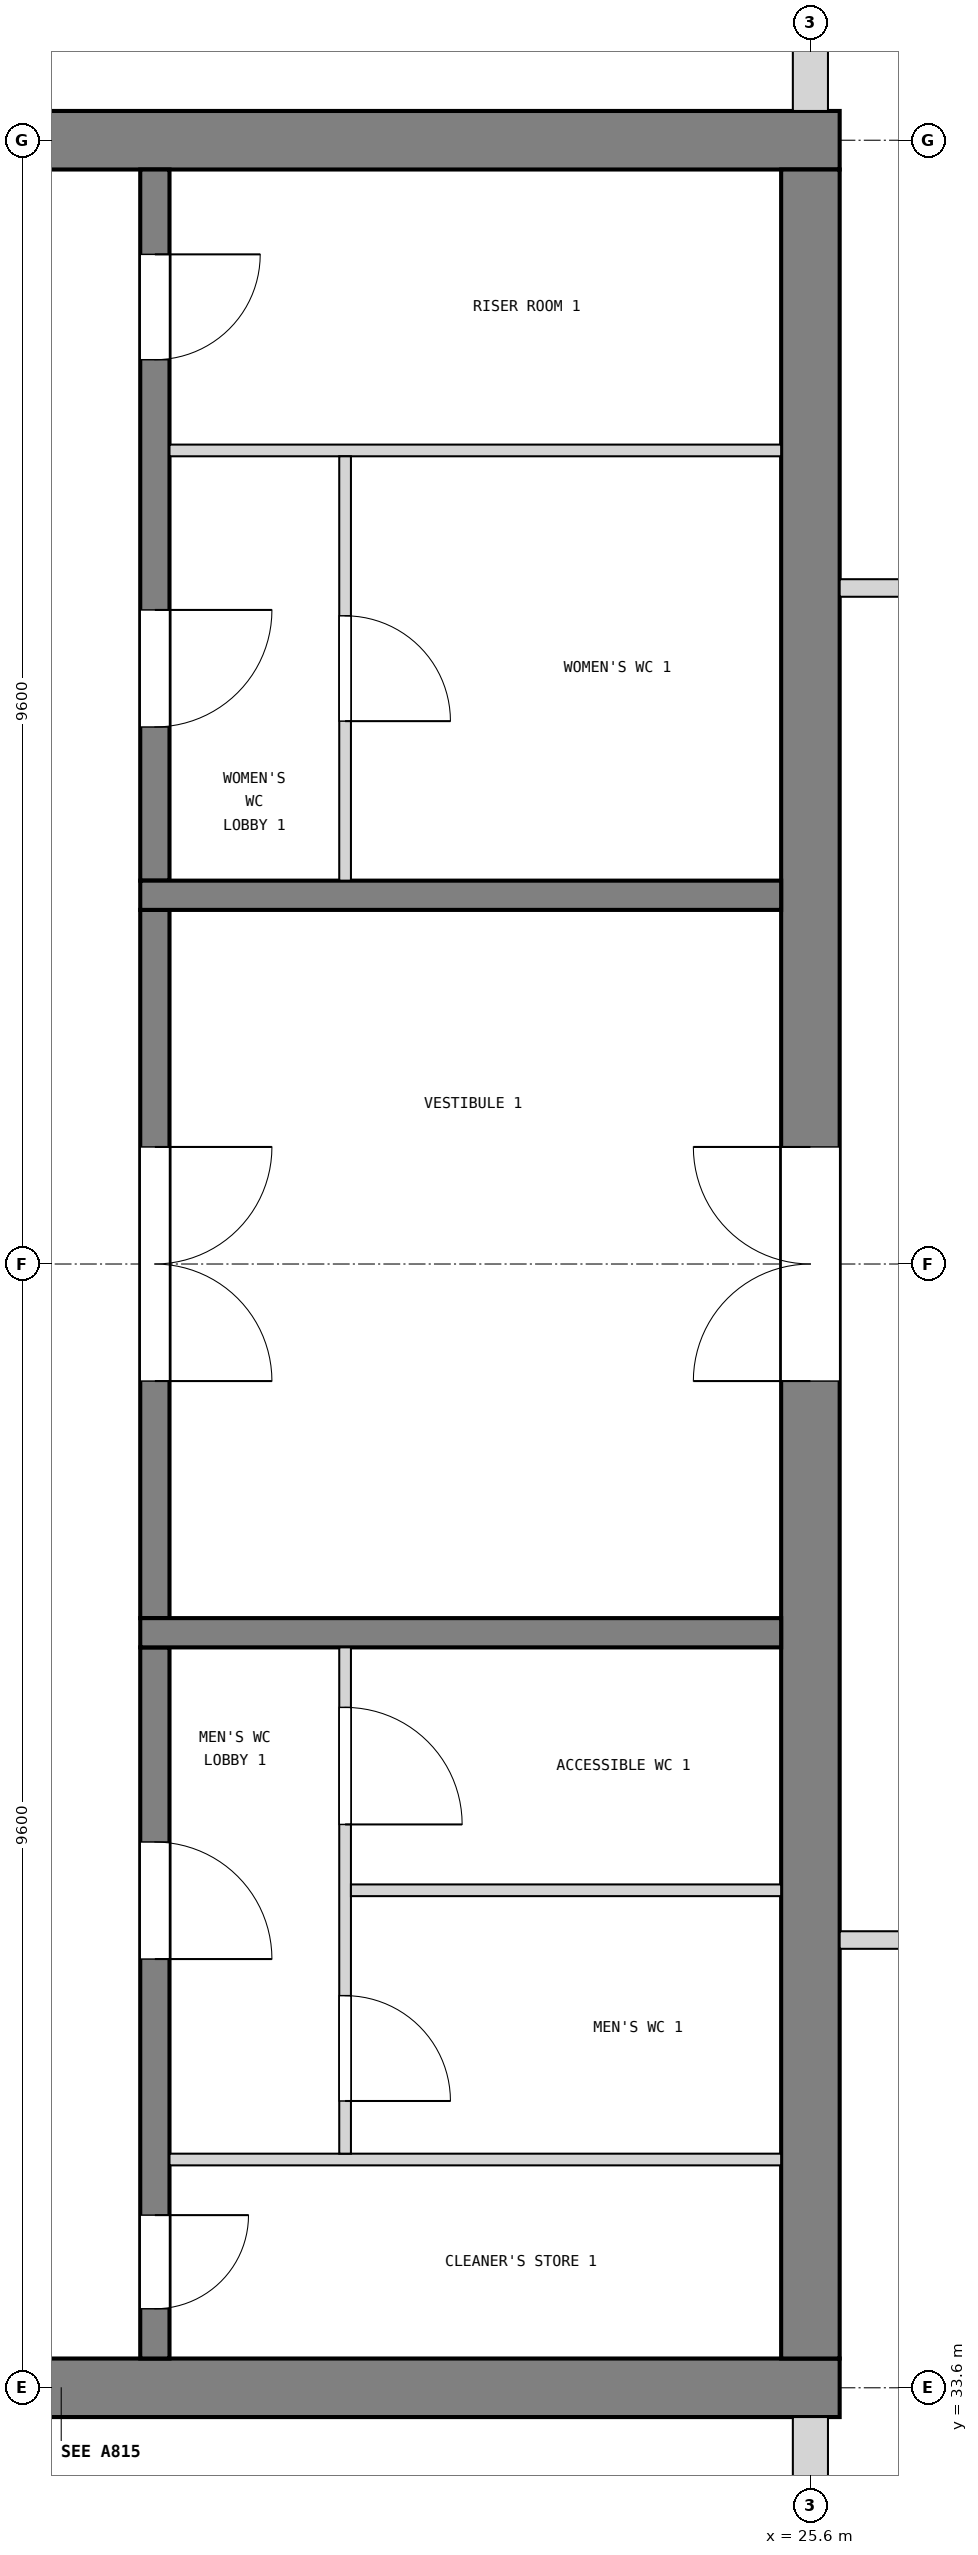
"""IFC4 building model, lengths in metres.
Left out: names, types, materials, properties, quantities, classifications, styles, units other than length and angle.
Written with IfcOpenShell. Run it as: python <this file> out.ifc"""

import sys

from ifc_helpers import new_model, si_unit, direction, frame, frame_2d, origin, place, context, subcontext, project, spatial, rectangle, extrude, element, fill, save


model = new_model("IFC4")
c1 = context("Model", 3, precision=1e-05, world=origin(), true_north=direction((0.0, 1.0)))
c2 = subcontext(c1, "Body", "Model", "MODEL_VIEW")
j1 = project(units=[si_unit("LENGTHUNIT", "METRE"), si_unit("PLANEANGLEUNIT", "RADIAN")], contexts=[c1])
p1 = place(None, origin())
s1 = spatial("IfcSite", under=j1, at=p1, CompositionType="ELEMENT")
p2 = place(p1, origin())
s2 = spatial("IfcBuilding", under=s1, at=p2, CompositionType="ELEMENT")
p3 = place(p2, frame((0.0, 0.0, 52.2)))
s3 = spatial("IfcBuildingStorey", under=s2, at=p3, CompositionType="ELEMENT", Elevation=52.2)
p4 = place(p3, frame((12.55, 52.8, 0.0), z_axis=(0.0, 0.0, 1.0), x_axis=(1.0, 0.0, 0.0)))
e1 = element("IfcWall", 1, at=p4, inside=s3, PredefinedType="SHEAR", context=c2, shape_type="SweptSolid", body=[
    extrude(rectangle(XDim=13.3, YDim=0.5, at=frame_2d((6.65, 0.0))), origin(), (0.0, 0.0, 1.0), 3.9),
])
p5 = place(p4, frame((1.85, 0.0, 1.0)))
e2 = element("IfcOpeningElement", 2, at=p5, cuts=e1, PredefinedType="OPENING", context=c2, shape_type="SweptSolid", body=[
    extrude(rectangle(XDim=0.4, YDim=2.0, at=frame_2d((0.2, 1.0))), frame((0.0, 0.26, 0.0), z_axis=(0.0, -1.0, 0.0), x_axis=(1.0, 0.0, 0.0)), (0.0, 0.0, 1.0), 0.52),
])
p6 = place(p3, frame((12.55, 33.6, 0.0), z_axis=(0.0, 0.0, 1.0), x_axis=(1.0, 0.0, 0.0)))
e3 = element("IfcWall", 3, at=p6, inside=s3, PredefinedType="SHEAR", context=c2, shape_type="SweptSolid", body=[
    extrude(rectangle(XDim=13.3, YDim=0.5, at=frame_2d((6.65, 0.0))), origin(), (0.0, 0.0, 1.0), 3.9),
])
p7 = place(p6, frame((1.85, 0.0, 1.0)))
e4 = element("IfcOpeningElement", 4, at=p7, cuts=e3, PredefinedType="OPENING", context=c2, shape_type="SweptSolid", body=[
    extrude(rectangle(XDim=0.4, YDim=2.0, at=frame_2d((0.2, 1.0))), frame((0.0, 0.26, 0.0), z_axis=(0.0, -1.0, 0.0), x_axis=(1.0, 0.0, 0.0)), (0.0, 0.0, 1.0), 0.52),
])
p8 = place(p3, frame((25.6, 33.85, 0.0), z_axis=(0.0, 0.0, 1.0), x_axis=(0.0, 1.0, 0.0)))
e5 = element("IfcWall", 5, at=p8, inside=s3, PredefinedType="SHEAR", context=c2, shape_type="SweptSolid", body=[
    extrude(rectangle(XDim=18.7, YDim=0.5, at=frame_2d((9.35, 0.0))), origin(), (0.0, 0.0, 1.0), 3.9),
])
p9 = place(p8, frame((8.35, 0.0, 0.0)))
e6 = element("IfcOpeningElement", 6, at=p9, cuts=e5, PredefinedType="OPENING", context=c2, shape_type="SweptSolid", body=[
    extrude(rectangle(XDim=2.0, YDim=2.1, at=frame_2d((1.0, 1.05))), frame((0.0, 0.26, 0.0), z_axis=(0.0, -1.0, 0.0), x_axis=(1.0, 0.0, 0.0)), (0.0, 0.0, 1.0), 0.52),
])
p10 = place(p3, frame((25.6, 31.0, 0.0), z_axis=(0.0, 0.0, 1.0), x_axis=(0.0, 1.0, 0.0)))
e7 = element("IfcWall", 7, at=p10, inside=s3, PredefinedType="SOLIDWALL", context=c2, shape_type="SweptSolid", body=[
    extrude(rectangle(XDim=2.35, YDim=0.3, at=frame_2d((1.175, 0.0))), origin(), (0.0, 0.0, 1.0), 2.88),
])
p11 = place(p3, frame((25.6, 53.05, 0.0), z_axis=(0.0, 0.0, 1.0), x_axis=(0.0, 1.0, 0.0)))
e8 = element("IfcWall", 8, at=p11, inside=s3, PredefinedType="SOLIDWALL", context=c2, shape_type="SweptSolid", body=[
    extrude(rectangle(XDim=2.35, YDim=0.3, at=frame_2d((1.175, 0.0))), origin(), (0.0, 0.0, 1.0), 2.88),
])
p12 = place(p3, frame((20.0, 33.85, 0.0), z_axis=(0.0, 0.0, 1.0), x_axis=(0.0, 1.0, 0.0)))
e9 = element("IfcWall", 9, at=p12, inside=s3, PredefinedType="SOLIDWALL", context=c2, shape_type="SweptSolid", body=[
    extrude(rectangle(XDim=6.075, YDim=0.25, at=frame_2d((3.038, 0.0))), origin(), (0.0, 0.0, 1.0), 3.6),
])
p13 = place(p12, frame((0.425, 0.0, 0.0)))
e10 = element("IfcOpeningElement", 10, at=p13, cuts=e9, PredefinedType="OPENING", context=c2, shape_type="SweptSolid", body=[
    extrude(rectangle(XDim=0.8, YDim=2.1, at=frame_2d((0.4, 1.05))), frame((0.0, 0.135, 0.0), z_axis=(0.0, -1.0, 0.0), x_axis=(1.0, 0.0, 0.0)), (0.0, 0.0, 1.0), 0.27),
])
p14 = place(p12, frame((3.413, 0.0, 0.0)))
e11 = element("IfcOpeningElement", 11, at=p14, cuts=e9, PredefinedType="OPENING", context=c2, shape_type="SweptSolid", body=[
    extrude(rectangle(XDim=1.0, YDim=2.1, at=frame_2d((0.5, 1.05))), frame((0.0, 0.135, 0.0), z_axis=(0.0, -1.0, 0.0), x_axis=(1.0, 0.0, 0.0)), (0.0, 0.0, 1.0), 0.27),
])
p15 = place(p3, frame((20.0, 40.175, 0.0), z_axis=(0.0, 0.0, 1.0), x_axis=(0.0, 1.0, 0.0)))
e12 = element("IfcWall", 12, at=p15, inside=s3, PredefinedType="SOLIDWALL", context=c2, shape_type="SweptSolid", body=[
    extrude(rectangle(XDim=6.05, YDim=0.25, at=frame_2d((3.025, 0.0))), origin(), (0.0, 0.0, 1.0), 3.6),
])
p16 = place(p15, frame((2.025, 0.0, 0.0)))
e13 = element("IfcOpeningElement", 13, at=p16, cuts=e12, PredefinedType="OPENING", context=c2, shape_type="SweptSolid", body=[
    extrude(rectangle(XDim=2.0, YDim=2.1, at=frame_2d((1.0, 1.05))), frame((0.0, 0.135, 0.0), z_axis=(0.0, -1.0, 0.0), x_axis=(1.0, 0.0, 0.0)), (0.0, 0.0, 1.0), 0.27),
])
p17 = place(p3, frame((20.0, 46.475, 0.0), z_axis=(0.0, 0.0, 1.0), x_axis=(0.0, 1.0, 0.0)))
e14 = element("IfcWall", 14, at=p17, inside=s3, PredefinedType="SOLIDWALL", context=c2, shape_type="SweptSolid", body=[
    extrude(rectangle(XDim=6.075, YDim=0.25, at=frame_2d((3.038, 0.0))), origin(), (0.0, 0.0, 1.0), 3.6),
])
p18 = place(p17, frame((1.312, 0.0, 0.0)))
e15 = element("IfcOpeningElement", 15, at=p18, cuts=e14, PredefinedType="OPENING", context=c2, shape_type="SweptSolid", body=[
    extrude(rectangle(XDim=1.0, YDim=2.1, at=frame_2d((0.5, 1.05))), frame((0.0, 0.135, 0.0), z_axis=(0.0, -1.0, 0.0), x_axis=(1.0, 0.0, 0.0)), (0.0, 0.0, 1.0), 0.27),
])
p19 = place(p17, frame((4.45, 0.0, 0.0)))
e16 = element("IfcOpeningElement", 16, at=p19, cuts=e14, PredefinedType="OPENING", context=c2, shape_type="SweptSolid", body=[
    extrude(rectangle(XDim=0.9, YDim=2.1, at=frame_2d((0.45, 1.05))), frame((0.0, 0.135, 0.0), z_axis=(0.0, -1.0, 0.0), x_axis=(1.0, 0.0, 0.0)), (0.0, 0.0, 1.0), 0.27),
])
for number, where, z_axis, x_axis in (
    (17, (19.875, 40.05, 0.0), (0.0, 0.0, 1.0), (1.0, 0.0, 0.0)),
    (18, (19.875, 46.35, 0.0), (0.0, 0.0, 1.0), (1.0, 0.0, 0.0)),
):
    element("IfcWall", number, at=place(p3, frame(where, z_axis=z_axis, x_axis=x_axis)), inside=s3, PredefinedType="SOLIDWALL", context=c2, shape_type="SweptSolid", body=[
        extrude(rectangle(XDim=5.475, YDim=0.25, at=frame_2d((2.738, 0.0))), origin(), (0.0, 0.0, 1.0), 3.6),
    ])
p20 = place(p3, frame((20.125, 35.55, 0.0), z_axis=(0.0, 0.0, 1.0), x_axis=(1.0, 0.0, 0.0)))
e19 = element("IfcWall", 19, at=p20, inside=s3, PredefinedType="PARTITIONING", context=c2, shape_type="SweptSolid", body=[
    extrude(rectangle(XDim=5.225, YDim=0.1, at=frame_2d((2.613, 0.0))), origin(), (0.0, 0.0, 1.0), 3.6),
])
p21 = place(p3, frame((21.625, 35.6, 0.0), z_axis=(0.0, 0.0, 1.0), x_axis=(0.0, 1.0, 0.0)))
e20 = element("IfcWall", 20, at=p21, inside=s3, PredefinedType="PARTITIONING", context=c2, shape_type="SweptSolid", body=[
    extrude(rectangle(XDim=4.325, YDim=0.1, at=frame_2d((2.163, 0.0))), origin(), (0.0, 0.0, 1.0), 3.6),
])
p22 = place(p21, frame((0.45, 0.0, 0.0)))
e21 = element("IfcOpeningElement", 21, at=p22, cuts=e20, PredefinedType="OPENING", context=c2, shape_type="SweptSolid", body=[
    extrude(rectangle(XDim=0.9, YDim=2.1, at=frame_2d((0.45, 1.05))), frame((0.0, 0.06, 0.0), z_axis=(0.0, -1.0, 0.0), x_axis=(1.0, 0.0, 0.0)), (0.0, 0.0, 1.0), 0.12),
])
p23 = place(p21, frame((2.812, 0.0, 0.0)))
e22 = element("IfcOpeningElement", 22, at=p23, cuts=e20, PredefinedType="OPENING", context=c2, shape_type="SweptSolid", body=[
    extrude(rectangle(XDim=1.0, YDim=2.1, at=frame_2d((0.5, 1.05))), frame((0.0, 0.06, 0.0), z_axis=(0.0, -1.0, 0.0), x_axis=(1.0, 0.0, 0.0)), (0.0, 0.0, 1.0), 0.12),
])
p24 = place(p3, frame((21.675, 37.85, 0.0), z_axis=(0.0, 0.0, 1.0), x_axis=(1.0, 0.0, 0.0)))
e23 = element("IfcWall", 23, at=p24, inside=s3, PredefinedType="PARTITIONING", context=c2, shape_type="SweptSolid", body=[
    extrude(rectangle(XDim=3.675, YDim=0.1, at=frame_2d((1.837, 0.0))), origin(), (0.0, 0.0, 1.0), 3.6),
])
p25 = place(p3, frame((20.125, 50.15, 0.0), z_axis=(0.0, 0.0, 1.0), x_axis=(1.0, 0.0, 0.0)))
e24 = element("IfcWall", 24, at=p25, inside=s3, PredefinedType="PARTITIONING", context=c2, shape_type="SweptSolid", body=[
    extrude(rectangle(XDim=5.225, YDim=0.1, at=frame_2d((2.613, 0.0))), origin(), (0.0, 0.0, 1.0), 3.6),
])
p26 = place(p3, frame((21.625, 46.475, 0.0), z_axis=(0.0, 0.0, 1.0), x_axis=(0.0, 1.0, 0.0)))
e25 = element("IfcWall", 25, at=p26, inside=s3, PredefinedType="PARTITIONING", context=c2, shape_type="SweptSolid", body=[
    extrude(rectangle(XDim=3.625, YDim=0.1, at=frame_2d((1.812, 0.0))), origin(), (0.0, 0.0, 1.0), 3.6),
])
p27 = place(p26, frame((1.363, 0.0, 0.0)))
e26 = element("IfcOpeningElement", 26, at=p27, cuts=e25, PredefinedType="OPENING", context=c2, shape_type="SweptSolid", body=[
    extrude(rectangle(XDim=0.9, YDim=2.1, at=frame_2d((0.45, 1.05))), frame((0.0, 0.06, 0.0), z_axis=(0.0, -1.0, 0.0), x_axis=(1.0, 0.0, 0.0)), (0.0, 0.0, 1.0), 0.12),
])
p28 = place(p3, frame((25.85, 37.425, 0.0), z_axis=(0.0, 0.0, 1.0), x_axis=(1.0, 0.0, 0.0)))
e27 = element("IfcWall", 27, at=p28, inside=s3, PredefinedType="PARTITIONING", context=c2, shape_type="SweptSolid", body=[
    extrude(rectangle(XDim=7.84, YDim=0.15, at=frame_2d((3.92, 0.0))), origin(), (0.0, 0.0, 1.0), 3.68),
])
p29 = place(p28, frame((3.0, 0.0, 0.0)))
e28 = element("IfcOpeningElement", 28, at=p29, cuts=e27, PredefinedType="OPENING", context=c2, shape_type="SweptSolid", body=[
    extrude(rectangle(XDim=1.8, YDim=2.1, at=frame_2d((0.9, 1.05))), frame((0.0, 0.085, 0.0), z_axis=(0.0, -1.0, 0.0), x_axis=(1.0, 0.0, 0.0)), (0.0, 0.0, 1.0), 0.17),
])
p30 = place(p3, frame((25.85, 48.975, 0.0), z_axis=(0.0, 0.0, 1.0), x_axis=(1.0, 0.0, 0.0)))
e29 = element("IfcWall", 29, at=p30, inside=s3, PredefinedType="PARTITIONING", context=c2, shape_type="SweptSolid", body=[
    extrude(rectangle(XDim=4.46, YDim=0.15, at=frame_2d((2.23, 0.0))), origin(), (0.0, 0.0, 1.0), 3.68),
])
p31 = place(p30, frame((1.7, 0.0, 0.0)))
e30 = element("IfcOpeningElement", 30, at=p31, cuts=e29, PredefinedType="OPENING", context=c2, shape_type="SweptSolid", body=[
    extrude(rectangle(XDim=1.0, YDim=2.1, at=frame_2d((0.5, 1.05))), frame((0.0, 0.085, 0.0), z_axis=(0.0, -1.0, 0.0), x_axis=(1.0, 0.0, 0.0)), (0.0, 0.0, 1.0), 0.17),
])
p32 = place(p16, frame((2.0, 0.0, 0.0), z_axis=(0.0, 0.0, 1.0), x_axis=(-1.0, 0.0, 0.0)))
e31 = element("IfcDoor", 31, at=p32, inside=s3, OperationType="DOUBLE_DOOR_SINGLE_SWING", PredefinedType="DOOR", context=c2, shape_type="SweptSolid", body=[
    extrude(rectangle(XDim=2.0, YDim=2.1, at=frame_2d((1.0, 1.05))), frame((0.0, 0.025, 0.0), z_axis=(0.0, -1.0, 0.0), x_axis=(1.0, 0.0, 0.0)), (0.0, 0.0, 1.0), 0.05),
])
fill(e13, e31)
p33 = place(p9, origin())
e32 = element("IfcDoor", 32, at=p33, inside=s3, OperationType="DOUBLE_DOOR_SINGLE_SWING", PredefinedType="DOOR", context=c2, shape_type="SweptSolid", body=[
    extrude(rectangle(XDim=2.0, YDim=2.1, at=frame_2d((1.0, 1.05))), frame((0.0, 0.025, 0.0), z_axis=(0.0, -1.0, 0.0), x_axis=(1.0, 0.0, 0.0)), (0.0, 0.0, 1.0), 0.05),
])
fill(e6, e32)
p34 = place(p13, frame((0.8, 0.0, 0.0), z_axis=(0.0, 0.0, 1.0), x_axis=(-1.0, 0.0, 0.0)))
e33 = element("IfcDoor", 33, at=p34, inside=s3, OperationType="SINGLE_SWING_LEFT", PredefinedType="DOOR", context=c2, shape_type="SweptSolid", body=[
    extrude(rectangle(XDim=0.8, YDim=2.1, at=frame_2d((0.4, 1.05))), frame((0.0, 0.025, 0.0), z_axis=(0.0, -1.0, 0.0), x_axis=(1.0, 0.0, 0.0)), (0.0, 0.0, 1.0), 0.05),
])
fill(e10, e33)
p35 = place(p14, frame((1.0, 0.0, 0.0), z_axis=(0.0, 0.0, 1.0), x_axis=(-1.0, 0.0, 0.0)))
e34 = element("IfcDoor", 34, at=p35, inside=s3, OperationType="SINGLE_SWING_RIGHT", PredefinedType="DOOR", context=c2, shape_type="SweptSolid", body=[
    extrude(rectangle(XDim=1.0, YDim=2.1, at=frame_2d((0.5, 1.05))), frame((0.0, 0.025, 0.0), z_axis=(0.0, -1.0, 0.0), x_axis=(1.0, 0.0, 0.0)), (0.0, 0.0, 1.0), 0.05),
])
fill(e11, e34)
p36 = place(p22, frame((0.9, 0.0, 0.0), z_axis=(0.0, 0.0, 1.0), x_axis=(-1.0, 0.0, 0.0)))
e35 = element("IfcDoor", 35, at=p36, inside=s3, OperationType="SINGLE_SWING_RIGHT", PredefinedType="DOOR", context=c2, shape_type="SweptSolid", body=[
    extrude(rectangle(XDim=0.9, YDim=2.1, at=frame_2d((0.45, 1.05))), frame((0.0, 0.025, 0.0), z_axis=(0.0, -1.0, 0.0), x_axis=(1.0, 0.0, 0.0)), (0.0, 0.0, 1.0), 0.05),
])
fill(e21, e35)
p37 = place(p23, frame((1.0, 0.0, 0.0), z_axis=(0.0, 0.0, 1.0), x_axis=(-1.0, 0.0, 0.0)))
e36 = element("IfcDoor", 36, at=p37, inside=s3, OperationType="SINGLE_SWING_RIGHT", PredefinedType="DOOR", context=c2, shape_type="SweptSolid", body=[
    extrude(rectangle(XDim=1.0, YDim=2.1, at=frame_2d((0.5, 1.05))), frame((0.0, 0.025, 0.0), z_axis=(0.0, -1.0, 0.0), x_axis=(1.0, 0.0, 0.0)), (0.0, 0.0, 1.0), 0.05),
])
fill(e22, e36)
p38 = place(p18, frame((1.0, 0.0, 0.0), z_axis=(0.0, 0.0, 1.0), x_axis=(-1.0, 0.0, 0.0)))
e37 = element("IfcDoor", 37, at=p38, inside=s3, OperationType="SINGLE_SWING_LEFT", PredefinedType="DOOR", context=c2, shape_type="SweptSolid", body=[
    extrude(rectangle(XDim=1.0, YDim=2.1, at=frame_2d((0.5, 1.05))), frame((0.0, 0.025, 0.0), z_axis=(0.0, -1.0, 0.0), x_axis=(1.0, 0.0, 0.0)), (0.0, 0.0, 1.0), 0.05),
])
fill(e15, e37)
p39 = place(p27, frame((0.9, 0.0, 0.0), z_axis=(0.0, 0.0, 1.0), x_axis=(-1.0, 0.0, 0.0)))
e38 = element("IfcDoor", 38, at=p39, inside=s3, OperationType="SINGLE_SWING_RIGHT", PredefinedType="DOOR", context=c2, shape_type="SweptSolid", body=[
    extrude(rectangle(XDim=0.9, YDim=2.1, at=frame_2d((0.45, 1.05))), frame((0.0, 0.025, 0.0), z_axis=(0.0, -1.0, 0.0), x_axis=(1.0, 0.0, 0.0)), (0.0, 0.0, 1.0), 0.05),
])
fill(e26, e38)
p40 = place(p19, frame((0.9, 0.0, 0.0), z_axis=(0.0, 0.0, 1.0), x_axis=(-1.0, 0.0, 0.0)))
e39 = element("IfcDoor", 39, at=p40, inside=s3, OperationType="SINGLE_SWING_LEFT", PredefinedType="DOOR", context=c2, shape_type="SweptSolid", body=[
    extrude(rectangle(XDim=0.9, YDim=2.1, at=frame_2d((0.45, 1.05))), frame((0.0, 0.025, 0.0), z_axis=(0.0, -1.0, 0.0), x_axis=(1.0, 0.0, 0.0)), (0.0, 0.0, 1.0), 0.05),
])
fill(e16, e39)
save(model, sys.argv[1])
